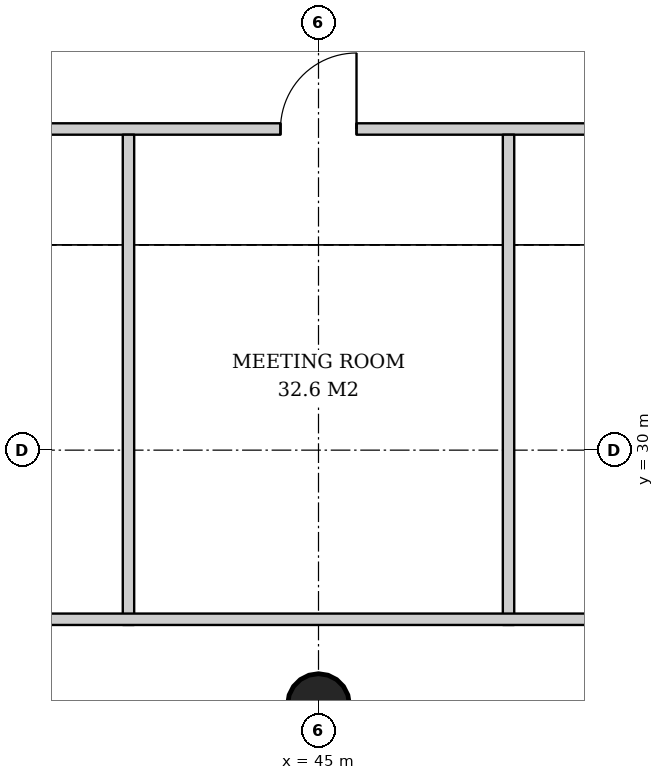
"""IFC4 building model, lengths in metres.
Left out: names, types, materials, properties, quantities, classifications, styles, units other than length and angle.
Written with IfcOpenShell. Run it as: python <this file> out.ifc"""

import sys

from ifc_helpers import new_model, si_unit, direction, frame, frame_2d, origin, origin_2d, place, context, subcontext, project, spatial, rectangle, hollow_circle, extrude, element, fill, save


model = new_model("IFC4")
c1 = context("Model", 3, precision=1e-05, world=origin(), true_north=direction((0.0, 1.0)))
c2 = subcontext(c1, "Body", "Model", "MODEL_VIEW")
j1 = project(units=[si_unit("LENGTHUNIT", "METRE"), si_unit("PLANEANGLEUNIT", "RADIAN")], contexts=[c1])
p1 = place(None, origin())
s1 = spatial("IfcSite", under=j1, at=p1, CompositionType="ELEMENT")
p2 = place(p1, origin())
s2 = spatial("IfcBuilding", under=s1, at=p2, CompositionType="ELEMENT")
p3 = place(p2, frame((0.0, 0.0, 165.4)))
s3 = spatial("IfcBuildingStorey", under=s2, at=p3, CompositionType="ELEMENT", Elevation=165.4)
p4 = place(p3, frame((45.0, 26.614, 0.0), z_axis=(0.0, 0.031914348339, 0.999490607445), x_axis=(-1.0, 0.0, 0.0)))
e1 = element("IfcColumn", 1, at=p4, inside=s3, PredefinedType="COLUMN", context=c2, shape_type="SweptSolid", body=[
    extrude(hollow_circle(Radius=0.406, WallThickness=0.03, at=origin_2d()), origin(), (0.0, 0.0, 1.0), 3.802),
])
p5 = place(p3, frame((33.15, 34.225, 0.0), z_axis=(0.0, 0.0, 1.0), x_axis=(1.0, 0.0, 0.0)))
e2 = element("IfcWall", 2, at=p5, inside=s3, PredefinedType="PARTITIONING", context=c2, shape_type="SweptSolid", body=[
    extrude(rectangle(XDim=23.55, YDim=0.15, at=frame_2d((11.775, 0.0))), origin(), (0.0, 0.0, 1.0), 2.85),
])
p6 = place(p5, frame((6.35, 0.0, 0.0)))
e3 = element("IfcOpeningElement", 3, at=p6, cuts=e2, PredefinedType="OPENING", context=c2, shape_type="SweptSolid", body=[
    extrude(rectangle(XDim=1.0, YDim=2.1, at=frame_2d((0.5, 1.05))), frame((0.0, 0.085, 0.0), z_axis=(0.0, -1.0, 0.0), x_axis=(1.0, 0.0, 0.0)), (0.0, 0.0, 1.0), 0.17),
])
p7 = place(p5, frame((11.35, 0.0, 0.0)))
e4 = element("IfcOpeningElement", 4, at=p7, cuts=e2, PredefinedType="OPENING", context=c2, shape_type="SweptSolid", body=[
    extrude(rectangle(XDim=1.0, YDim=2.1, at=frame_2d((0.5, 1.05))), frame((0.0, 0.085, 0.0), z_axis=(0.0, -1.0, 0.0), x_axis=(1.0, 0.0, 0.0)), (0.0, 0.0, 1.0), 0.17),
])
p8 = place(p5, frame((16.35, 0.0, 0.0)))
e5 = element("IfcOpeningElement", 5, at=p8, cuts=e2, PredefinedType="OPENING", context=c2, shape_type="SweptSolid", body=[
    extrude(rectangle(XDim=1.0, YDim=2.1, at=frame_2d((0.5, 1.05))), frame((0.0, 0.085, 0.0), z_axis=(0.0, -1.0, 0.0), x_axis=(1.0, 0.0, 0.0)), (0.0, 0.0, 1.0), 0.17),
])
for number, where, z_axis, x_axis in (
    (6, (42.5, 34.15, 0.0), (0.0, 0.0, 1.0), (0.0, -1.0, 0.0)),
    (7, (47.5, 34.15, 0.0), (0.0, 0.0, 1.0), (0.0, -1.0, 0.0)),
):
    element("IfcWall", number, at=place(p3, frame(where, z_axis=z_axis, x_axis=x_axis)), inside=s3, PredefinedType="PARTITIONING", context=c2, shape_type="SweptSolid", body=[
        extrude(rectangle(XDim=6.45, YDim=0.15, at=frame_2d((3.225, 0.0))), origin(), (0.0, 0.0, 1.0), 3.62),
    ])
p9 = place(p3, frame((60.3, 27.775, 0.0), z_axis=(0.0, 0.0, 1.0), x_axis=(-1.0, 0.0, 0.0)))
e8 = element("IfcWall", 8, at=p9, inside=s3, PredefinedType="PARTITIONING", context=c2, shape_type="SweptSolid", body=[
    extrude(rectangle(XDim=30.6, YDim=0.15, at=frame_2d((15.3, 0.0))), origin(), (0.0, 0.0, 1.0), 2.85),
])
p10 = place(p7, origin())
e9 = element("IfcDoor", 9, at=p10, inside=s3, OperationType="SINGLE_SWING_RIGHT", PredefinedType="DOOR", context=c2, shape_type="SweptSolid", body=[
    extrude(rectangle(XDim=1.0, YDim=2.1, at=frame_2d((0.5, 1.05))), frame((0.0, 0.025, 0.0), z_axis=(0.0, -1.0, 0.0), x_axis=(1.0, 0.0, 0.0)), (0.0, 0.0, 1.0), 0.05),
])
fill(e4, e9)
save(model, sys.argv[1])
